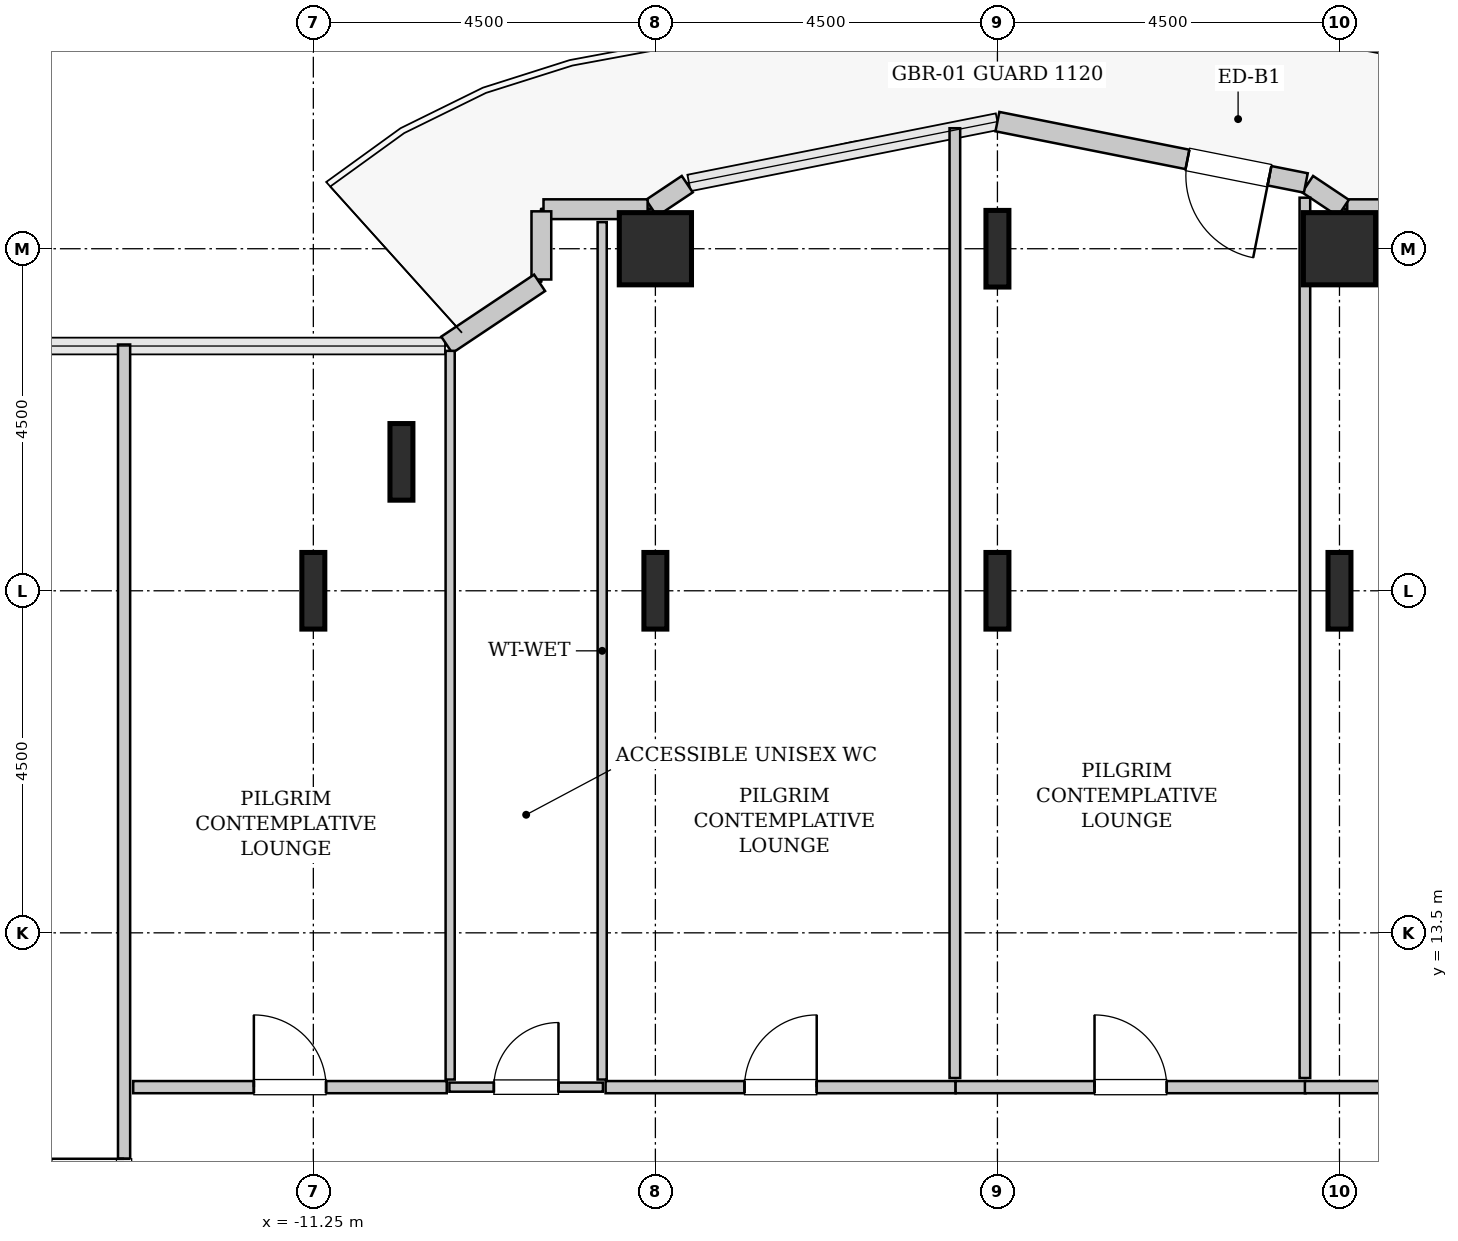
"""IFC4 building model, lengths in metres.
Left out: names, types, materials, properties, quantities, classifications, styles, units other than length and angle.
Written with IfcOpenShell. Run it as: python <this file> out.ifc"""

import sys

from ifc_helpers import new_model, si_unit, direction, frame, frame_2d, origin, origin_2d, place, context, subcontext, project, spatial, rectangle, hollow_rectangle, i_section, extrude, source, transform, mapped, element, fill, save


model = new_model("IFC4")
c1 = context("Model", 3, precision=1e-05, world=origin(), true_north=direction((0.0, 1.0)))
c2 = subcontext(c1, "Body", "Model", "MODEL_VIEW")
j1 = project(units=[si_unit("LENGTHUNIT", "METRE"), si_unit("PLANEANGLEUNIT", "RADIAN")], contexts=[c1])
p1 = place(None, origin())
s1 = spatial("IfcSite", under=j1, at=p1, CompositionType="ELEMENT")
p2 = place(p1, origin())
s2 = spatial("IfcBuilding", under=s1, at=p2, CompositionType="ELEMENT")
p3 = place(p2, frame((0.0, 0.0, 67.2)))
s3 = spatial("IfcBuildingStorey", under=s2, at=p3, CompositionType="ELEMENT", Elevation=67.2)
m1 = source(origin(), c2, "Body", "SweptSolid", [
    extrude(i_section(OverallWidth=0.302, OverallDepth=1.008, WebThickness=0.021, FlangeThickness=0.04, FilletRadius=0.03, at=origin_2d()), origin(), (0.0, 0.0, 1.0), 3.8),
])
for number, where, z_axis, x_axis in (
    (1, (-11.25, 18.0, 0.0), (0.0, 0.0, 1.0), (1.0, 0.0, 0.0)),
    (2, (-10.091, 19.696, 0.0), (0.0, 0.0, 1.0), (1.0, 0.0, 0.0)),
    (3, (-6.75, 18.0, 0.0), (0.0, 0.0, 1.0), (1.0, 0.0, 0.0)),
):
    element("IfcColumn", number, at=place(p3, frame(where, z_axis=z_axis, x_axis=x_axis)), inside=s3, PredefinedType="COLUMN", context=c2, shape_type="MappedRepresentation", body=[
        mapped(m1, transform((0.0, 0.0, 0.0), x_axis=(1.0, 0.0, 0.0), y_axis=(0.0, 1.0, 0.0), z_axis=(0.0, 0.0, 1.0), scale=1.0)),
    ])
m2 = source(origin(), c2, "Body", "SweptSolid", [
    extrude(hollow_rectangle(XDim=0.95, YDim=0.95, WallThickness=0.045, InnerFilletRadius=0.045, OuterFilletRadius=0.09, at=origin_2d()), origin(), (0.0, 0.0, 1.0), 3.8),
])
p4 = place(p3, frame((-6.75, 22.5, 0.0), z_axis=(0.0, 0.0, 1.0), x_axis=(1.0, 0.0, 0.0)))
e4 = element("IfcColumn", 4, at=p4, inside=s3, PredefinedType="COLUMN", context=c2, shape_type="MappedRepresentation", body=[
    mapped(m2, transform((0.0, 0.0, 0.0), x_axis=(1.0, 0.0, 0.0), y_axis=(0.0, 1.0, 0.0), z_axis=(0.0, 0.0, 1.0), scale=1.0)),
])
for number, where, z_axis, x_axis in (
    (5, (-2.25, 18.0, 0.0), (0.0, 0.0, 1.0), (1.0, 0.0, 0.0)),
    (6, (-2.25, 22.5, 0.0), (0.0, 0.0, 1.0), (1.0, 0.0, 0.0)),
    (7, (2.25, 18.0, 0.0), (0.0, 0.0, 1.0), (1.0, 0.0, 0.0)),
):
    element("IfcColumn", number, at=place(p3, frame(where, z_axis=z_axis, x_axis=x_axis)), inside=s3, PredefinedType="COLUMN", context=c2, shape_type="MappedRepresentation", body=[
        mapped(m1, transform((0.0, 0.0, 0.0), x_axis=(1.0, 0.0, 0.0), y_axis=(0.0, 1.0, 0.0), z_axis=(0.0, 0.0, 1.0), scale=1.0)),
    ])
p5 = place(p3, frame((2.25, 22.5, 0.0), z_axis=(0.0, 0.0, 1.0), x_axis=(1.0, 0.0, 0.0)))
e8 = element("IfcColumn", 8, at=p5, inside=s3, PredefinedType="COLUMN", context=c2, shape_type="MappedRepresentation", body=[
    mapped(m2, transform((0.0, 0.0, 0.0), x_axis=(1.0, 0.0, 0.0), y_axis=(0.0, 1.0, 0.0), z_axis=(0.0, 0.0, 1.0), scale=1.0)),
])
m3 = source(origin(), c2, "Body", "SweptSolid", [
    extrude(rectangle(XDim=1.37, YDim=0.26, at=frame_2d((0.685, 0.0))), origin(), (0.0, 0.0, 1.0), 3.55),
])
p6 = place(p3, frame((3.722, 23.02, 0.0), z_axis=(0.0, 0.0, 1.0), x_axis=(-1.0, 0.0, 0.0)))
e9 = element("IfcWall", 9, at=p6, inside=s3, PredefinedType="SOLIDWALL", context=c2, shape_type="MappedRepresentation", body=[
    mapped(m3, transform((0.0, 0.0, 0.0), x_axis=(1.0, 0.0, 0.0), y_axis=(0.0, 1.0, 0.0), z_axis=(0.0, 0.0, 1.0), scale=1.0)),
])
m4 = source(origin(), c2, "Body", "SweptSolid", [
    extrude(rectangle(XDim=0.565, YDim=0.26, at=frame_2d((0.283, 0.0))), origin(), (0.0, 0.0, 1.0), 3.55),
])
p7 = place(p3, frame((2.301, 23.036, 0.0), z_axis=(0.0, 0.0, 1.0), x_axis=(-0.831651492666, 0.555297933317, 0.0)))
e10 = element("IfcWall", 10, at=p7, inside=s3, PredefinedType="SOLIDWALL", context=c2, shape_type="MappedRepresentation", body=[
    mapped(m4, transform((0.0, 0.0, 0.0), x_axis=(1.0, 0.0, 0.0), y_axis=(0.0, 1.0, 0.0), z_axis=(0.0, 0.0, 1.0), scale=1.0)),
])
m5 = source(origin(), c2, "Body", "SweptSolid", [
    extrude(rectangle(XDim=4.137, YDim=0.26, at=frame_2d((2.068, 0.0))), origin(), (0.0, 0.0, 1.0), 3.55),
])
p8 = place(p3, frame((1.807, 23.365, 0.0), z_axis=(0.0, 0.0, 1.0), x_axis=(-0.980782170794, 0.195105954428, 0.0)))
e11 = element("IfcWall", 11, at=p8, inside=s3, PredefinedType="SOLIDWALL", context=c2, shape_type="MappedRepresentation", body=[
    mapped(m5, transform((0.0, 0.0, 0.0), x_axis=(1.0, 0.0, 0.0), y_axis=(0.0, 1.0, 0.0), z_axis=(0.0, 0.0, 1.0), scale=1.0)),
])
p9 = place(p8, frame((0.488, 0.0, 0.0)))
e12 = element("IfcOpeningElement", 12, at=p9, cuts=e11, PredefinedType="OPENING", context=c2, shape_type="SweptSolid", body=[
    extrude(rectangle(XDim=1.1, YDim=2.2, at=frame_2d((0.55, 1.1))), frame((0.0, 0.14, 0.0), z_axis=(0.0, -1.0, 0.0), x_axis=(1.0, 0.0, 0.0)), (0.0, 0.0, 1.0), 0.28),
])
p10 = place(p3, frame((-6.331, 23.35, 0.0), z_axis=(0.0, 0.0, 1.0), x_axis=(-0.831651492666, -0.555297933317, 0.0)))
e13 = element("IfcWall", 13, at=p10, inside=s3, PredefinedType="SOLIDWALL", context=c2, shape_type="MappedRepresentation", body=[
    mapped(m4, transform((0.0, 0.0, 0.0), x_axis=(1.0, 0.0, 0.0), y_axis=(0.0, 1.0, 0.0), z_axis=(0.0, 0.0, 1.0), scale=1.0)),
])
p11 = place(p3, frame((-6.852, 23.02, 0.0), z_axis=(0.0, 0.0, 1.0), x_axis=(-1.0, 0.0, 0.0)))
e14 = element("IfcWall", 14, at=p11, inside=s3, PredefinedType="SOLIDWALL", context=c2, shape_type="MappedRepresentation", body=[
    mapped(m3, transform((0.0, 0.0, 0.0), x_axis=(1.0, 0.0, 0.0), y_axis=(0.0, 1.0, 0.0), z_axis=(0.0, 0.0, 1.0), scale=1.0)),
])
m6 = source(origin(), c2, "Body", "SweptSolid", [
    extrude(rectangle(XDim=0.897, YDim=0.26, at=frame_2d((0.448, 0.0))), origin(), (0.0, 0.0, 1.0), 3.55),
])
p12 = place(p3, frame((-8.25, 22.992, 0.0), z_axis=(0.0, 0.0, 1.0), x_axis=(0.0, -1.0, 0.0)))
e15 = element("IfcWall", 15, at=p12, inside=s3, PredefinedType="SOLIDWALL", context=c2, shape_type="MappedRepresentation", body=[
    mapped(m6, transform((0.0, 0.0, 0.0), x_axis=(1.0, 0.0, 0.0), y_axis=(0.0, 1.0, 0.0), z_axis=(0.0, 0.0, 1.0), scale=1.0)),
])
m7 = source(origin(), c2, "Body", "SweptSolid", [
    extrude(rectangle(XDim=1.469, YDim=0.26, at=frame_2d((0.734, 0.0))), origin(), (0.0, 0.0, 1.0), 3.55),
])
p13 = place(p3, frame((-8.273, 22.052, 0.0), z_axis=(0.0, 0.0, 1.0), x_axis=(-0.831461760506, -0.555581983884, 0.0)))
e16 = element("IfcWall", 16, at=p13, inside=s3, PredefinedType="SOLIDWALL", context=c2, shape_type="MappedRepresentation", body=[
    mapped(m7, transform((0.0, 0.0, 0.0), x_axis=(1.0, 0.0, 0.0), y_axis=(0.0, 1.0, 0.0), z_axis=(0.0, 0.0, 1.0), scale=1.0)),
])
m8 = source(origin(), c2, "Body", "SweptSolid", [
    extrude(rectangle(XDim=2.02, YDim=0.12, at=frame_2d((1.01, 0.0))), origin(), (0.0, 0.0, 1.0), 3.535),
])
p14 = place(p3, frame((-9.46, 11.47, 0.0), z_axis=(0.0, 0.0, 1.0), x_axis=(1.0, 0.0, 0.0)))
e17 = element("IfcWall", 17, at=p14, inside=s3, PredefinedType="PLUMBINGWALL", context=c2, shape_type="MappedRepresentation", body=[
    mapped(m8, transform((0.0, 0.0, 0.0), x_axis=(1.0, 0.0, 0.0), y_axis=(0.0, 1.0, 0.0), z_axis=(0.0, 0.0, 1.0), scale=1.0)),
])
p15 = place(p14, frame((0.585, 0.0, 0.0)))
e18 = element("IfcOpeningElement", 18, at=p15, cuts=e17, PredefinedType="OPENING", context=c2, shape_type="SweptSolid", body=[
    extrude(rectangle(XDim=0.85, YDim=2.1, at=frame_2d((0.425, 1.05))), frame((0.0, 0.07, 0.0), z_axis=(0.0, -1.0, 0.0), x_axis=(1.0, 0.0, 0.0)), (0.0, 0.0, 1.0), 0.14),
])
m9 = source(origin(), c2, "Body", "SweptSolid", [
    extrude(rectangle(XDim=11.28, YDim=0.12, at=frame_2d((5.64, 0.0))), origin(), (0.0, 0.0, 1.0), 3.535),
])
p16 = place(p3, frame((-7.45, 11.57, 0.0), z_axis=(0.0, 0.0, 1.0), x_axis=(0.0, 1.0, 0.0)))
e19 = element("IfcWall", 19, at=p16, inside=s3, PredefinedType="PLUMBINGWALL", context=c2, shape_type="MappedRepresentation", body=[
    mapped(m9, transform((0.0, 0.0, 0.0), x_axis=(1.0, 0.0, 0.0), y_axis=(0.0, 1.0, 0.0), z_axis=(0.0, 0.0, 1.0), scale=1.0)),
])
m10 = source(origin(), c2, "Body", "SweptSolid", [
    extrude(rectangle(XDim=9.587, YDim=0.12, at=frame_2d((4.793, 0.0))), origin(), (0.0, 0.0, 1.0), 3.535),
])
p17 = place(p3, frame((-9.45, 11.57, 0.0), z_axis=(0.0, 0.0, 1.0), x_axis=(0.0, 1.0, 0.0)))
e20 = element("IfcWall", 20, at=p17, inside=s3, PredefinedType="PLUMBINGWALL", context=c2, shape_type="MappedRepresentation", body=[
    mapped(m10, transform((0.0, 0.0, 0.0), x_axis=(1.0, 0.0, 0.0), y_axis=(0.0, 1.0, 0.0), z_axis=(0.0, 0.0, 1.0), scale=1.0)),
])
m11 = source(origin(), c2, "Body", "SweptSolid", [
    extrude(rectangle(XDim=12.645, YDim=0.16, at=frame_2d((6.323, 0.0))), origin(), (0.0, 0.0, 1.0), 3.535),
])
p18 = place(p3, frame((-13.74, 8.595, 0.0), z_axis=(0.0, 0.0, 1.0), x_axis=(0.0, 1.0, 0.0)))
e21 = element("IfcWall", 21, at=p18, inside=s3, PredefinedType="PARTITIONING", context=c2, shape_type="MappedRepresentation", body=[
    mapped(m11, transform((0.0, 0.0, 0.0), x_axis=(1.0, 0.0, 0.0), y_axis=(0.0, 1.0, 0.0), z_axis=(0.0, 0.0, 1.0), scale=1.0)),
])
p19 = place(p18, frame((0.982, 0.0, 0.0)))
e22 = element("IfcOpeningElement", 22, at=p19, cuts=e21, PredefinedType="OPENING", context=c2, shape_type="SweptSolid", body=[
    extrude(rectangle(XDim=0.95, YDim=2.1, at=frame_2d((0.475, 1.05))), frame((0.0, 0.09, 0.0), z_axis=(0.0, -1.0, 0.0), x_axis=(1.0, 0.0, 0.0)), (0.0, 0.0, 1.0), 0.18),
])
m12 = source(origin(), c2, "Body", "SweptSolid", [
    extrude(rectangle(XDim=4.125, YDim=0.16, at=frame_2d((2.062, 0.0))), origin(), (0.0, 0.0, 1.0), 3.535),
])
p20 = place(p3, frame((-13.62, 11.47, 0.0), z_axis=(0.0, 0.0, 1.0), x_axis=(1.0, 0.0, 0.0)))
e23 = element("IfcWall", 23, at=p20, inside=s3, PredefinedType="PARTITIONING", context=c2, shape_type="MappedRepresentation", body=[
    mapped(m12, transform((0.0, 0.0, 0.0), x_axis=(1.0, 0.0, 0.0), y_axis=(0.0, 1.0, 0.0), z_axis=(0.0, 0.0, 1.0), scale=1.0)),
])
p21 = place(p20, frame((1.587, 0.0, 0.0)))
e24 = element("IfcOpeningElement", 24, at=p21, cuts=e23, PredefinedType="OPENING", context=c2, shape_type="SweptSolid", body=[
    extrude(rectangle(XDim=0.95, YDim=2.1, at=frame_2d((0.475, 1.05))), frame((0.0, 0.09, 0.0), z_axis=(0.0, -1.0, 0.0), x_axis=(1.0, 0.0, 0.0)), (0.0, 0.0, 1.0), 0.18),
])
m13 = source(origin(), c2, "Body", "SweptSolid", [
    extrude(rectangle(XDim=4.605, YDim=0.16, at=frame_2d((2.302, 0.0))), origin(), (0.0, 0.0, 1.0), 3.535),
])
p22 = place(p3, frame((-7.405, 11.47, 0.0), z_axis=(0.0, 0.0, 1.0), x_axis=(1.0, 0.0, 0.0)))
e25 = element("IfcWall", 25, at=p22, inside=s3, PredefinedType="PARTITIONING", context=c2, shape_type="MappedRepresentation", body=[
    mapped(m13, transform((0.0, 0.0, 0.0), x_axis=(1.0, 0.0, 0.0), y_axis=(0.0, 1.0, 0.0), z_axis=(0.0, 0.0, 1.0), scale=1.0)),
])
p23 = place(p22, frame((1.827, 0.0, 0.0)))
e26 = element("IfcOpeningElement", 26, at=p23, cuts=e25, PredefinedType="OPENING", context=c2, shape_type="SweptSolid", body=[
    extrude(rectangle(XDim=0.95, YDim=2.1, at=frame_2d((0.475, 1.05))), frame((0.0, 0.09, 0.0), z_axis=(0.0, -1.0, 0.0), x_axis=(1.0, 0.0, 0.0)), (0.0, 0.0, 1.0), 0.18),
])
m14 = source(origin(), c2, "Body", "SweptSolid", [
    extrude(rectangle(XDim=12.495, YDim=0.14, at=frame_2d((6.248, 0.0))), origin(), (0.0, 0.0, 1.0), 3.535),
])
p24 = place(p3, frame((-2.81, 11.59, 0.0), z_axis=(0.0, 0.0, 1.0), x_axis=(0.0, 1.0, 0.0)))
e27 = element("IfcWall", 27, at=p24, inside=s3, PredefinedType="PARTITIONING", context=c2, shape_type="MappedRepresentation", body=[
    mapped(m14, transform((0.0, 0.0, 0.0), x_axis=(1.0, 0.0, 0.0), y_axis=(0.0, 1.0, 0.0), z_axis=(0.0, 0.0, 1.0), scale=1.0)),
])
p25 = place(p3, frame((-2.8, 11.47, 0.0), z_axis=(0.0, 0.0, 1.0), x_axis=(1.0, 0.0, 0.0)))
e28 = element("IfcWall", 28, at=p25, inside=s3, PredefinedType="PARTITIONING", context=c2, shape_type="MappedRepresentation", body=[
    mapped(m13, transform((0.0, 0.0, 0.0), x_axis=(1.0, 0.0, 0.0), y_axis=(0.0, 1.0, 0.0), z_axis=(0.0, 0.0, 1.0), scale=1.0)),
])
p26 = place(p25, frame((1.827, 0.0, 0.0)))
e29 = element("IfcOpeningElement", 29, at=p26, cuts=e28, PredefinedType="OPENING", context=c2, shape_type="SweptSolid", body=[
    extrude(rectangle(XDim=0.95, YDim=2.1, at=frame_2d((0.475, 1.05))), frame((0.0, 0.09, 0.0), z_axis=(0.0, -1.0, 0.0), x_axis=(1.0, 0.0, 0.0)), (0.0, 0.0, 1.0), 0.18),
])
m15 = source(origin(), c2, "Body", "SweptSolid", [
    extrude(rectangle(XDim=11.581, YDim=0.14, at=frame_2d((5.791, 0.0))), origin(), (0.0, 0.0, 1.0), 2.825),
])
p27 = place(p3, frame((1.795, 11.59, 0.0), z_axis=(0.0, 0.0, 1.0), x_axis=(0.0, 1.0, 0.0)))
e30 = element("IfcWall", 30, at=p27, inside=s3, PredefinedType="PARTITIONING", context=c2, shape_type="MappedRepresentation", body=[
    mapped(m15, transform((0.0, 0.0, 0.0), x_axis=(1.0, 0.0, 0.0), y_axis=(0.0, 1.0, 0.0), z_axis=(0.0, 0.0, 1.0), scale=1.0)),
])
m16 = source(origin(), c2, "Body", "SweptSolid", [
    extrude(rectangle(XDim=6.61, YDim=0.16, at=frame_2d((3.305, 0.0))), origin(), (0.0, 0.0, 1.0), 3.535),
])
p28 = place(p3, frame((1.795, 11.47, 0.0), z_axis=(0.0, 0.0, 1.0), x_axis=(1.0, 0.0, 0.0)))
e31 = element("IfcWall", 31, at=p28, inside=s3, PredefinedType="PARTITIONING", context=c2, shape_type="MappedRepresentation", body=[
    mapped(m16, transform((0.0, 0.0, 0.0), x_axis=(1.0, 0.0, 0.0), y_axis=(0.0, 1.0, 0.0), z_axis=(0.0, 0.0, 1.0), scale=1.0)),
])
p29 = place(p28, frame((2.83, 0.0, 0.0)))
e32 = element("IfcOpeningElement", 32, at=p29, cuts=e31, PredefinedType="OPENING", context=c2, shape_type="SweptSolid", body=[
    extrude(rectangle(XDim=0.95, YDim=2.1, at=frame_2d((0.475, 1.05))), frame((0.0, 0.09, 0.0), z_axis=(0.0, -1.0, 0.0), x_axis=(1.0, 0.0, 0.0)), (0.0, 0.0, 1.0), 0.18),
])
m17 = source(origin(), c2, "Body", "SweptSolid", [
    extrude(rectangle(XDim=1.1, YDim=2.2, at=frame_2d((0.55, 1.1))), frame((0.0, 0.025, 0.0), z_axis=(0.0, -1.0, 0.0), x_axis=(1.0, 0.0, 0.0)), (0.0, 0.0, 1.0), 0.05),
])
p30 = place(p9, origin())
e33 = element("IfcDoor", 33, at=p30, inside=s3, OperationType="SINGLE_SWING_LEFT", PredefinedType="DOOR", context=c2, shape_type="MappedRepresentation", body=[
    mapped(m17, transform((0.0, 0.0, 0.0), x_axis=(1.0, 0.0, 0.0), y_axis=(0.0, 1.0, 0.0), z_axis=(0.0, 0.0, 1.0), scale=1.0)),
])
fill(e12, e33)
m18 = source(origin(), c2, "Body", "SweptSolid", [
    extrude(rectangle(XDim=0.85, YDim=2.1, at=frame_2d((0.425, 1.05))), frame((0.0, 0.025, 0.0), z_axis=(0.0, -1.0, 0.0), x_axis=(1.0, 0.0, 0.0)), (0.0, 0.0, 1.0), 0.05),
])
p31 = place(p15, origin())
e34 = element("IfcDoor", 34, at=p31, inside=s3, OperationType="SINGLE_SWING_RIGHT", PredefinedType="DOOR", context=c2, shape_type="MappedRepresentation", body=[
    mapped(m18, transform((0.0, 0.0, 0.0), x_axis=(1.0, 0.0, 0.0), y_axis=(0.0, 1.0, 0.0), z_axis=(0.0, 0.0, 1.0), scale=1.0)),
])
fill(e18, e34)
m19 = source(origin(), c2, "Body", "SweptSolid", [
    extrude(rectangle(XDim=0.95, YDim=2.1, at=frame_2d((0.475, 1.05))), frame((0.0, 0.025, 0.0), z_axis=(0.0, -1.0, 0.0), x_axis=(1.0, 0.0, 0.0)), (0.0, 0.0, 1.0), 0.05),
])
p32 = place(p19, origin())
e35 = element("IfcDoor", 35, at=p32, inside=s3, OperationType="SINGLE_SWING_RIGHT", PredefinedType="DOOR", context=c2, shape_type="MappedRepresentation", body=[
    mapped(m19, transform((0.0, 0.0, 0.0), x_axis=(1.0, 0.0, 0.0), y_axis=(0.0, 1.0, 0.0), z_axis=(0.0, 0.0, 1.0), scale=1.0)),
])
fill(e22, e35)
p33 = place(p21, origin())
e36 = element("IfcDoor", 36, at=p33, inside=s3, OperationType="SINGLE_SWING_LEFT", PredefinedType="DOOR", context=c2, shape_type="MappedRepresentation", body=[
    mapped(m19, transform((0.0, 0.0, 0.0), x_axis=(1.0, 0.0, 0.0), y_axis=(0.0, 1.0, 0.0), z_axis=(0.0, 0.0, 1.0), scale=1.0)),
])
fill(e24, e36)
p34 = place(p23, origin())
e37 = element("IfcDoor", 37, at=p34, inside=s3, OperationType="SINGLE_SWING_RIGHT", PredefinedType="DOOR", context=c2, shape_type="MappedRepresentation", body=[
    mapped(m19, transform((0.0, 0.0, 0.0), x_axis=(1.0, 0.0, 0.0), y_axis=(0.0, 1.0, 0.0), z_axis=(0.0, 0.0, 1.0), scale=1.0)),
])
fill(e26, e37)
p35 = place(p26, origin())
e38 = element("IfcDoor", 38, at=p35, inside=s3, OperationType="SINGLE_SWING_LEFT", PredefinedType="DOOR", context=c2, shape_type="MappedRepresentation", body=[
    mapped(m19, transform((0.0, 0.0, 0.0), x_axis=(1.0, 0.0, 0.0), y_axis=(0.0, 1.0, 0.0), z_axis=(0.0, 0.0, 1.0), scale=1.0)),
])
fill(e29, e38)
save(model, sys.argv[1])
